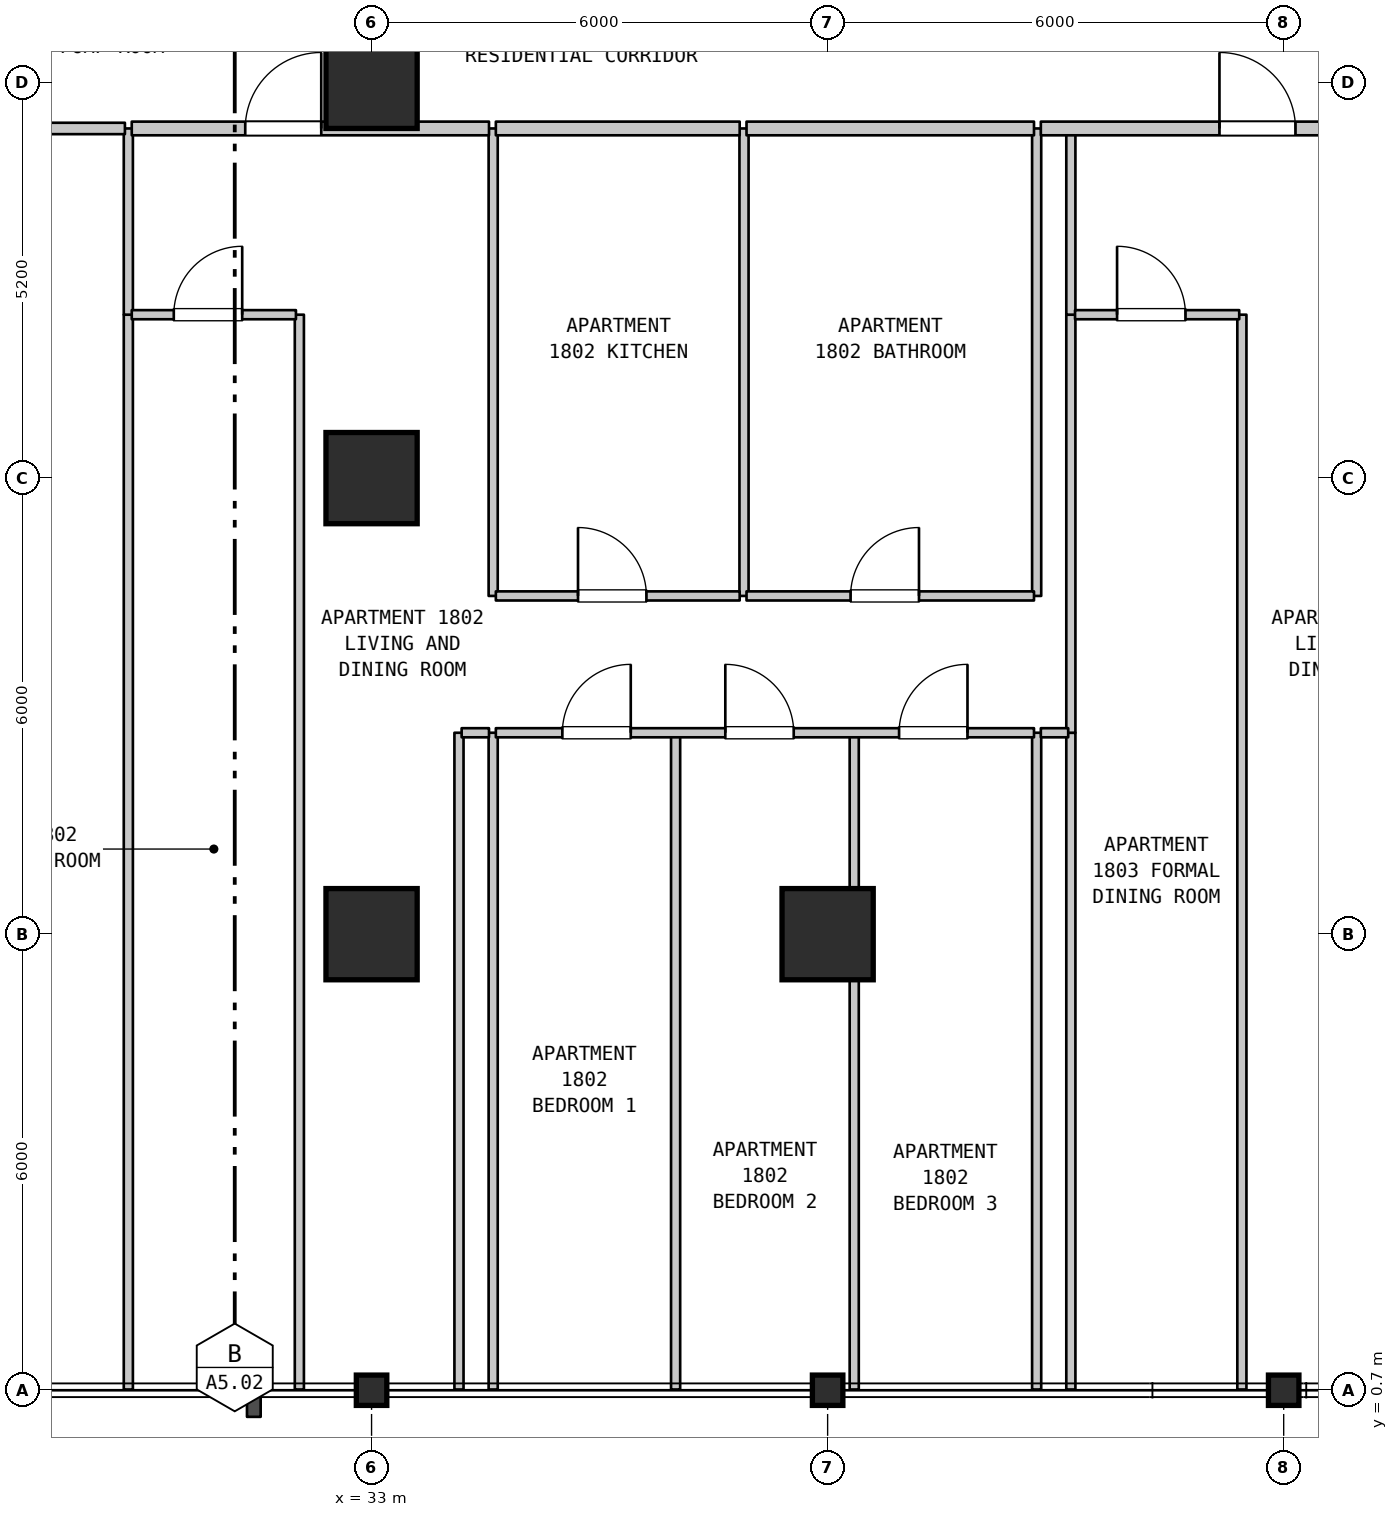
"""IFC4 building model, lengths in metres.
Left out: names, types, materials, properties, quantities, classifications, styles, units other than length and angle.
Written with IfcOpenShell. Run it as: python <this file> out.ifc"""

import sys

from ifc_helpers import new_model, si_unit, direction, frame, frame_2d, origin, origin_2d, place, context, subcontext, project, spatial, rectangle, i_section, extrude, element, fill, save


model = new_model("IFC4")
c1 = context("Model", 3, precision=1e-05, world=origin(), true_north=direction((0.0, 1.0)))
c2 = subcontext(c1, "Body", "Model", "MODEL_VIEW")
j1 = project(units=[si_unit("LENGTHUNIT", "METRE"), si_unit("PLANEANGLEUNIT", "RADIAN")], contexts=[c1])
p1 = place(None, origin())
s1 = spatial("IfcSite", under=j1, at=p1, CompositionType="ELEMENT")
p2 = place(p1, origin())
s2 = spatial("IfcBuilding", under=s1, at=p2, CompositionType="ELEMENT")
p3 = place(p2, frame((0.0, 0.0, 77.5)))
s3 = spatial("IfcBuildingStorey", under=s2, at=p3, CompositionType="ELEMENT", Elevation=77.5)
p4 = place(p3, frame((33.0, 0.7, 0.0), z_axis=(0.0, 0.0, 1.0), x_axis=(1.0, 0.0, 0.0)))
e1 = element("IfcColumn", 1, at=p4, inside=s3, PredefinedType="COLUMN", context=c2, shape_type="SweptSolid", body=[
    extrude(i_section(OverallWidth=0.401, OverallDepth=0.399, WebThickness=0.025, FlangeThickness=0.04, FilletRadius=0.015, at=origin_2d()), origin(), (0.0, 0.0, 1.0), 3.7),
])
for number, where, z_axis, x_axis in (
    (2, (33.0, 6.7, 0.0), (0.0, 0.0, 1.0), (1.0, 0.0, 0.0)),
    (3, (33.0, 12.7, 0.0), (0.0, 0.0, 1.0), (1.0, 0.0, 0.0)),
    (4, (33.0, 17.9, 0.0), (0.0, 0.0, 1.0), (1.0, 0.0, 0.0)),
):
    element("IfcColumn", number, at=place(p3, frame(where, z_axis=z_axis, x_axis=x_axis)), inside=s3, PredefinedType="COLUMN", context=c2, shape_type="SweptSolid", body=[
        extrude(rectangle(XDim=1.2, YDim=1.2, at=origin_2d()), origin(), (0.0, 0.0, 1.0), 3.7),
    ])
p5 = place(p3, frame((39.0, 0.7, 0.0), z_axis=(0.0, 0.0, 1.0), x_axis=(1.0, 0.0, 0.0)))
e5 = element("IfcColumn", 5, at=p5, inside=s3, PredefinedType="COLUMN", context=c2, shape_type="SweptSolid", body=[
    extrude(i_section(OverallWidth=0.401, OverallDepth=0.399, WebThickness=0.025, FlangeThickness=0.04, FilletRadius=0.015, at=origin_2d()), origin(), (0.0, 0.0, 1.0), 3.7),
])
p6 = place(p3, frame((39.0, 6.7, 0.0), z_axis=(0.0, 0.0, 1.0), x_axis=(1.0, 0.0, 0.0)))
e6 = element("IfcColumn", 6, at=p6, inside=s3, PredefinedType="COLUMN", context=c2, shape_type="SweptSolid", body=[
    extrude(rectangle(XDim=1.2, YDim=1.2, at=origin_2d()), origin(), (0.0, 0.0, 1.0), 3.7),
])
p7 = place(p3, frame((45.0, 0.7, 0.0), z_axis=(0.0, 0.0, 1.0), x_axis=(1.0, 0.0, 0.0)))
e7 = element("IfcColumn", 7, at=p7, inside=s3, PredefinedType="COLUMN", context=c2, shape_type="SweptSolid", body=[
    extrude(i_section(OverallWidth=0.401, OverallDepth=0.399, WebThickness=0.025, FlangeThickness=0.04, FilletRadius=0.015, at=origin_2d()), origin(), (0.0, 0.0, 1.0), 3.7),
])
p8 = place(p3, frame((29.8, 0.71, 0.0), z_axis=(0.0, 0.0, 1.0), x_axis=(0.0, 1.0, 0.0)))
e8 = element("IfcWall", 8, at=p8, inside=s3, PredefinedType="PARTITIONING", context=c2, shape_type="SweptSolid", body=[
    extrude(rectangle(XDim=14.14, YDim=0.12, at=frame_2d((7.07, 0.0))), origin(), (0.0, 0.0, 1.0), 3.28),
])
p9 = place(p3, frame((29.8, 14.85, 0.0), z_axis=(0.0, 0.0, 1.0), x_axis=(0.0, 1.0, 0.0)))
e9 = element("IfcWall", 9, at=p9, inside=s3, PredefinedType="PARTITIONING", context=c2, shape_type="SweptSolid", body=[
    extrude(rectangle(XDim=2.45, YDim=0.12, at=frame_2d((1.225, 0.0))), origin(), (0.0, 0.0, 1.0), 3.28),
])
p10 = place(p3, frame((32.05, 0.71, 0.0), z_axis=(0.0, 0.0, 1.0), x_axis=(0.0, 1.0, 0.0)))
e10 = element("IfcWall", 10, at=p10, inside=s3, PredefinedType="PARTITIONING", context=c2, shape_type="SweptSolid", body=[
    extrude(rectangle(XDim=14.14, YDim=0.12, at=frame_2d((7.07, 0.0))), origin(), (0.0, 0.0, 1.0), 3.28),
])
for number, where, z_axis, x_axis in (
    (11, (34.15, 0.71, 0.0), (0.0, 0.0, 1.0), (0.0, 1.0, 0.0)),
    (12, (34.6, 0.71, 0.0), (0.0, 0.0, 1.0), (0.0, 1.0, 0.0)),
):
    element("IfcWall", number, at=place(p3, frame(where, z_axis=z_axis, x_axis=x_axis)), inside=s3, PredefinedType="PARTITIONING", context=c2, shape_type="SweptSolid", body=[
        extrude(rectangle(XDim=8.64, YDim=0.12, at=frame_2d((4.32, 0.0))), origin(), (0.0, 0.0, 1.0), 3.28),
    ])
p11 = place(p3, frame((34.6, 11.15, 0.0), z_axis=(0.0, 0.0, 1.0), x_axis=(0.0, 1.0, 0.0)))
e13 = element("IfcWall", 13, at=p11, inside=s3, PredefinedType="PARTITIONING", context=c2, shape_type="SweptSolid", body=[
    extrude(rectangle(XDim=6.15, YDim=0.12, at=frame_2d((3.075, 0.0))), origin(), (0.0, 0.0, 1.0), 3.28),
])
p12 = place(p3, frame((37.0, 0.71, 0.0), z_axis=(0.0, 0.0, 1.0), x_axis=(0.0, 1.0, 0.0)))
e14 = element("IfcWall", 14, at=p12, inside=s3, PredefinedType="PARTITIONING", context=c2, shape_type="SweptSolid", body=[
    extrude(rectangle(XDim=8.64, YDim=0.12, at=frame_2d((4.32, 0.0))), origin(), (0.0, 0.0, 1.0), 3.28),
])
p13 = place(p3, frame((37.9, 11.15, 0.0), z_axis=(0.0, 0.0, 1.0), x_axis=(0.0, 1.0, 0.0)))
e15 = element("IfcWall", 15, at=p13, inside=s3, PredefinedType="PARTITIONING", context=c2, shape_type="SweptSolid", body=[
    extrude(rectangle(XDim=6.15, YDim=0.12, at=frame_2d((3.075, 0.0))), origin(), (0.0, 0.0, 1.0), 3.28),
])
for number, where, z_axis, x_axis in (
    (16, (39.35, 0.71, 0.0), (0.0, 0.0, 1.0), (0.0, 1.0, 0.0)),
    (17, (41.75, 0.71, 0.0), (0.0, 0.0, 1.0), (0.0, 1.0, 0.0)),
):
    element("IfcWall", number, at=place(p3, frame(where, z_axis=z_axis, x_axis=x_axis)), inside=s3, PredefinedType="PARTITIONING", context=c2, shape_type="SweptSolid", body=[
        extrude(rectangle(XDim=8.64, YDim=0.12, at=frame_2d((4.32, 0.0))), origin(), (0.0, 0.0, 1.0), 3.28),
    ])
p14 = place(p3, frame((41.75, 11.15, 0.0), z_axis=(0.0, 0.0, 1.0), x_axis=(0.0, 1.0, 0.0)))
e18 = element("IfcWall", 18, at=p14, inside=s3, PredefinedType="PARTITIONING", context=c2, shape_type="SweptSolid", body=[
    extrude(rectangle(XDim=6.15, YDim=0.12, at=frame_2d((3.075, 0.0))), origin(), (0.0, 0.0, 1.0), 3.28),
])
p15 = place(p3, frame((42.2, 0.71, 0.0), z_axis=(0.0, 0.0, 1.0), x_axis=(0.0, 1.0, 0.0)))
e19 = element("IfcWall", 19, at=p15, inside=s3, PredefinedType="PARTITIONING", context=c2, shape_type="SweptSolid", body=[
    extrude(rectangle(XDim=8.64, YDim=0.12, at=frame_2d((4.32, 0.0))), origin(), (0.0, 0.0, 1.0), 3.28),
])
p16 = place(p3, frame((42.2, 9.35, 0.0), z_axis=(0.0, 0.0, 1.0), x_axis=(0.0, 1.0, 0.0)))
e20 = element("IfcWall", 20, at=p16, inside=s3, PredefinedType="PARTITIONING", context=c2, shape_type="SweptSolid", body=[
    extrude(rectangle(XDim=5.5, YDim=0.12, at=frame_2d((2.75, 0.0))), origin(), (0.0, 0.0, 1.0), 3.28),
])
p17 = place(p3, frame((42.2, 14.85, 0.0), z_axis=(0.0, 0.0, 1.0), x_axis=(0.0, 1.0, 0.0)))
e21 = element("IfcWall", 21, at=p17, inside=s3, PredefinedType="PARTITIONING", context=c2, shape_type="SweptSolid", body=[
    extrude(rectangle(XDim=2.45, YDim=0.12, at=frame_2d((1.225, 0.0))), origin(), (0.0, 0.0, 1.0), 3.28),
])
p18 = place(p3, frame((44.45, 0.71, 0.0), z_axis=(0.0, 0.0, 1.0), x_axis=(0.0, 1.0, 0.0)))
e22 = element("IfcWall", 22, at=p18, inside=s3, PredefinedType="PARTITIONING", context=c2, shape_type="SweptSolid", body=[
    extrude(rectangle(XDim=14.14, YDim=0.12, at=frame_2d((7.07, 0.0))), origin(), (0.0, 0.0, 1.0), 3.28),
])
p19 = place(p3, frame((34.185, 9.35, 0.0), z_axis=(0.0, 0.0, 1.0), x_axis=(1.0, 0.0, 0.0)))
e23 = element("IfcWall", 23, at=p19, inside=s3, PredefinedType="PARTITIONING", context=c2, shape_type="SweptSolid", body=[
    extrude(rectangle(XDim=0.36, YDim=0.12, at=frame_2d((0.18, 0.0))), origin(), (0.0, 0.0, 1.0), 3.28),
])
p20 = place(p3, frame((34.635, 9.35, 0.0), z_axis=(0.0, 0.0, 1.0), x_axis=(1.0, 0.0, 0.0)))
e24 = element("IfcWall", 24, at=p20, inside=s3, PredefinedType="PARTITIONING", context=c2, shape_type="SweptSolid", body=[
    extrude(rectangle(XDim=7.08, YDim=0.12, at=frame_2d((3.54, 0.0))), origin(), (0.0, 0.0, 1.0), 3.28),
])
p21 = place(p20, frame((0.875, 0.0, 0.0)))
e25 = element("IfcOpeningElement", 25, at=p21, cuts=e24, PredefinedType="OPENING", context=c2, shape_type="SweptSolid", body=[
    extrude(rectangle(XDim=0.9, YDim=2.15, at=frame_2d((0.45, 1.075))), frame((0.0, 0.07, 0.0), z_axis=(0.0, -1.0, 0.0), x_axis=(1.0, 0.0, 0.0)), (0.0, 0.0, 1.0), 0.14),
])
p22 = place(p20, frame((3.019, 0.0, 0.0)))
e26 = element("IfcOpeningElement", 26, at=p22, cuts=e24, PredefinedType="OPENING", context=c2, shape_type="SweptSolid", body=[
    extrude(rectangle(XDim=0.9, YDim=2.15, at=frame_2d((0.45, 1.075))), frame((0.0, 0.07, 0.0), z_axis=(0.0, -1.0, 0.0), x_axis=(1.0, 0.0, 0.0)), (0.0, 0.0, 1.0), 0.14),
])
p23 = place(p20, frame((5.305, 0.0, 0.0)))
e27 = element("IfcOpeningElement", 27, at=p23, cuts=e24, PredefinedType="OPENING", context=c2, shape_type="SweptSolid", body=[
    extrude(rectangle(XDim=0.9, YDim=2.15, at=frame_2d((0.45, 1.075))), frame((0.0, 0.07, 0.0), z_axis=(0.0, -1.0, 0.0), x_axis=(1.0, 0.0, 0.0)), (0.0, 0.0, 1.0), 0.14),
])
p24 = place(p3, frame((41.805, 9.35, 0.0), z_axis=(0.0, 0.0, 1.0), x_axis=(1.0, 0.0, 0.0)))
e28 = element("IfcWall", 28, at=p24, inside=s3, PredefinedType="PARTITIONING", context=c2, shape_type="SweptSolid", body=[
    extrude(rectangle(XDim=0.36, YDim=0.12, at=frame_2d((0.18, 0.0))), origin(), (0.0, 0.0, 1.0), 3.28),
])
p25 = place(p3, frame((34.635, 11.15, 0.0), z_axis=(0.0, 0.0, 1.0), x_axis=(1.0, 0.0, 0.0)))
e29 = element("IfcWall", 29, at=p25, inside=s3, PredefinedType="PARTITIONING", context=c2, shape_type="SweptSolid", body=[
    extrude(rectangle(XDim=3.208, YDim=0.12, at=frame_2d((1.604, 0.0))), origin(), (0.0, 0.0, 1.0), 3.28),
])
p26 = place(p25, frame((1.081, 0.0, 0.0)))
e30 = element("IfcOpeningElement", 30, at=p26, cuts=e29, PredefinedType="OPENING", context=c2, shape_type="SweptSolid", body=[
    extrude(rectangle(XDim=0.9, YDim=2.15, at=frame_2d((0.45, 1.075))), frame((0.0, 0.07, 0.0), z_axis=(0.0, -1.0, 0.0), x_axis=(1.0, 0.0, 0.0)), (0.0, 0.0, 1.0), 0.14),
])
p27 = place(p3, frame((37.933, 11.15, 0.0), z_axis=(0.0, 0.0, 1.0), x_axis=(1.0, 0.0, 0.0)))
e31 = element("IfcWall", 31, at=p27, inside=s3, PredefinedType="PARTITIONING", context=c2, shape_type="SweptSolid", body=[
    extrude(rectangle(XDim=3.782, YDim=0.12, at=frame_2d((1.891, 0.0))), origin(), (0.0, 0.0, 1.0), 3.28),
])
p28 = place(p27, frame((1.369, 0.0, 0.0)))
e32 = element("IfcOpeningElement", 32, at=p28, cuts=e31, PredefinedType="OPENING", context=c2, shape_type="SweptSolid", body=[
    extrude(rectangle(XDim=0.9, YDim=2.1, at=frame_2d((0.45, 1.05))), frame((0.0, 0.07, 0.0), z_axis=(0.0, -1.0, 0.0), x_axis=(1.0, 0.0, 0.0)), (0.0, 0.0, 1.0), 0.14),
])
p29 = place(p3, frame((29.845, 14.85, 0.0), z_axis=(0.0, 0.0, 1.0), x_axis=(1.0, 0.0, 0.0)))
e33 = element("IfcWall", 33, at=p29, inside=s3, PredefinedType="PARTITIONING", context=c2, shape_type="SweptSolid", body=[
    extrude(rectangle(XDim=2.16, YDim=0.12, at=frame_2d((1.08, 0.0))), origin(), (0.0, 0.0, 1.0), 3.28),
])
p30 = place(p29, frame((0.553, 0.0, 0.0)))
e34 = element("IfcOpeningElement", 34, at=p30, cuts=e33, PredefinedType="OPENING", context=c2, shape_type="SweptSolid", body=[
    extrude(rectangle(XDim=0.9, YDim=2.15, at=frame_2d((0.45, 1.075))), frame((0.0, 0.07, 0.0), z_axis=(0.0, -1.0, 0.0), x_axis=(1.0, 0.0, 0.0)), (0.0, 0.0, 1.0), 0.14),
])
p31 = place(p3, frame((42.255, 14.85, 0.0), z_axis=(0.0, 0.0, 1.0), x_axis=(1.0, 0.0, 0.0)))
e35 = element("IfcWall", 35, at=p31, inside=s3, PredefinedType="PARTITIONING", context=c2, shape_type="SweptSolid", body=[
    extrude(rectangle(XDim=2.16, YDim=0.12, at=frame_2d((1.08, 0.0))), origin(), (0.0, 0.0, 1.0), 3.28),
])
p32 = place(p31, frame((0.553, 0.0, 0.0)))
e36 = element("IfcOpeningElement", 36, at=p32, cuts=e35, PredefinedType="OPENING", context=c2, shape_type="SweptSolid", body=[
    extrude(rectangle(XDim=0.9, YDim=2.15, at=frame_2d((0.45, 1.075))), frame((0.0, 0.07, 0.0), z_axis=(0.0, -1.0, 0.0), x_axis=(1.0, 0.0, 0.0)), (0.0, 0.0, 1.0), 0.14),
])
p33 = place(p3, frame((25.545, 17.3, 0.0), z_axis=(0.0, 0.0, 1.0), x_axis=(1.0, 0.0, 0.0)))
e37 = element("IfcWall", 37, at=p33, inside=s3, PredefinedType="STANDARD", context=c2, shape_type="SweptSolid", body=[
    extrude(rectangle(XDim=4.21, YDim=0.15, at=frame_2d((2.105, 0.0))), origin(), (0.0, 0.0, 1.0), 3.28),
])
p34 = place(p33, frame((1.605, 0.0, 0.0)))
e38 = element("IfcOpeningElement", 38, at=p34, cuts=e37, PredefinedType="OPENING", context=c2, shape_type="SweptSolid", body=[
    extrude(rectangle(XDim=1.0, YDim=2.15, at=frame_2d((0.5, 1.075))), frame((0.0, 0.085, 0.0), z_axis=(0.0, -1.0, 0.0), x_axis=(1.0, 0.0, 0.0)), (0.0, 0.0, 1.0), 0.17),
])
p35 = place(p3, frame((29.845, 17.3, 0.0), z_axis=(0.0, 0.0, 1.0), x_axis=(1.0, 0.0, 0.0)))
e39 = element("IfcWall", 39, at=p35, inside=s3, PredefinedType="STANDARD", context=c2, shape_type="SweptSolid", body=[
    extrude(rectangle(XDim=4.7, YDim=0.18, at=frame_2d((2.35, 0.0))), origin(), (0.0, 0.0, 1.0), 3.28),
])
p36 = place(p35, frame((1.493, 0.0, 0.0)))
e40 = element("IfcOpeningElement", 40, at=p36, cuts=e39, PredefinedType="OPENING", context=c2, shape_type="SweptSolid", body=[
    extrude(rectangle(XDim=1.0, YDim=2.15, at=frame_2d((0.5, 1.075))), frame((0.0, 0.1, 0.0), z_axis=(0.0, -1.0, 0.0), x_axis=(1.0, 0.0, 0.0)), (0.0, 0.0, 1.0), 0.2),
])
p37 = place(p3, frame((34.635, 17.3, 0.0), z_axis=(0.0, 0.0, 1.0), x_axis=(1.0, 0.0, 0.0)))
e41 = element("IfcWall", 41, at=p37, inside=s3, PredefinedType="STANDARD", context=c2, shape_type="SweptSolid", body=[
    extrude(rectangle(XDim=3.208, YDim=0.18, at=frame_2d((1.604, 0.0))), origin(), (0.0, 0.0, 1.0), 3.28),
])
p38 = place(p3, frame((37.933, 17.3, 0.0), z_axis=(0.0, 0.0, 1.0), x_axis=(1.0, 0.0, 0.0)))
e42 = element("IfcWall", 42, at=p38, inside=s3, PredefinedType="STANDARD", context=c2, shape_type="SweptSolid", body=[
    extrude(rectangle(XDim=3.782, YDim=0.18, at=frame_2d((1.891, 0.0))), origin(), (0.0, 0.0, 1.0), 3.28),
])
p39 = place(p3, frame((41.805, 17.3, 0.0), z_axis=(0.0, 0.0, 1.0), x_axis=(1.0, 0.0, 0.0)))
e43 = element("IfcWall", 43, at=p39, inside=s3, PredefinedType="STANDARD", context=c2, shape_type="SweptSolid", body=[
    extrude(rectangle(XDim=5.3, YDim=0.18, at=frame_2d((2.65, 0.0))), origin(), (0.0, 0.0, 1.0), 3.28),
])
p40 = place(p39, frame((2.35, 0.0, 0.0)))
e44 = element("IfcOpeningElement", 44, at=p40, cuts=e43, PredefinedType="OPENING", context=c2, shape_type="SweptSolid", body=[
    extrude(rectangle(XDim=1.0, YDim=2.15, at=frame_2d((0.5, 1.075))), frame((0.0, 0.1, 0.0), z_axis=(0.0, -1.0, 0.0), x_axis=(1.0, 0.0, 0.0)), (0.0, 0.0, 1.0), 0.2),
])
p41 = place(p21, origin())
e45 = element("IfcDoor", 45, at=p41, inside=s3, OperationType="SINGLE_SWING_RIGHT", PredefinedType="DOOR", context=c2, shape_type="SweptSolid", body=[
    extrude(rectangle(XDim=0.9, YDim=2.15, at=frame_2d((0.45, 1.075))), frame((0.0, 0.025, 0.0), z_axis=(0.0, -1.0, 0.0), x_axis=(1.0, 0.0, 0.0)), (0.0, 0.0, 1.0), 0.05),
])
fill(e25, e45)
p42 = place(p22, origin())
e46 = element("IfcDoor", 46, at=p42, inside=s3, OperationType="SINGLE_SWING_LEFT", PredefinedType="DOOR", context=c2, shape_type="SweptSolid", body=[
    extrude(rectangle(XDim=0.9, YDim=2.15, at=frame_2d((0.45, 1.075))), frame((0.0, 0.025, 0.0), z_axis=(0.0, -1.0, 0.0), x_axis=(1.0, 0.0, 0.0)), (0.0, 0.0, 1.0), 0.05),
])
fill(e26, e46)
p43 = place(p23, origin())
e47 = element("IfcDoor", 47, at=p43, inside=s3, OperationType="SINGLE_SWING_RIGHT", PredefinedType="DOOR", context=c2, shape_type="SweptSolid", body=[
    extrude(rectangle(XDim=0.9, YDim=2.15, at=frame_2d((0.45, 1.075))), frame((0.0, 0.025, 0.0), z_axis=(0.0, -1.0, 0.0), x_axis=(1.0, 0.0, 0.0)), (0.0, 0.0, 1.0), 0.05),
])
fill(e27, e47)
p44 = place(p26, origin())
e48 = element("IfcDoor", 48, at=p44, inside=s3, OperationType="SINGLE_SWING_LEFT", PredefinedType="DOOR", context=c2, shape_type="SweptSolid", body=[
    extrude(rectangle(XDim=0.9, YDim=2.15, at=frame_2d((0.45, 1.075))), frame((0.0, 0.025, 0.0), z_axis=(0.0, -1.0, 0.0), x_axis=(1.0, 0.0, 0.0)), (0.0, 0.0, 1.0), 0.05),
])
fill(e30, e48)
p45 = place(p28, origin())
e49 = element("IfcDoor", 49, at=p45, inside=s3, OperationType="SINGLE_SWING_RIGHT", PredefinedType="DOOR", context=c2, shape_type="SweptSolid", body=[
    extrude(rectangle(XDim=0.9, YDim=2.1, at=frame_2d((0.45, 1.05))), frame((0.0, 0.025, 0.0), z_axis=(0.0, -1.0, 0.0), x_axis=(1.0, 0.0, 0.0)), (0.0, 0.0, 1.0), 0.05),
])
fill(e32, e49)
p46 = place(p30, origin())
e50 = element("IfcDoor", 50, at=p46, inside=s3, OperationType="SINGLE_SWING_RIGHT", PredefinedType="DOOR", context=c2, shape_type="SweptSolid", body=[
    extrude(rectangle(XDim=0.9, YDim=2.15, at=frame_2d((0.45, 1.075))), frame((0.0, 0.025, 0.0), z_axis=(0.0, -1.0, 0.0), x_axis=(1.0, 0.0, 0.0)), (0.0, 0.0, 1.0), 0.05),
])
fill(e34, e50)
p47 = place(p32, origin())
e51 = element("IfcDoor", 51, at=p47, inside=s3, OperationType="SINGLE_SWING_LEFT", PredefinedType="DOOR", context=c2, shape_type="SweptSolid", body=[
    extrude(rectangle(XDim=0.9, YDim=2.15, at=frame_2d((0.45, 1.075))), frame((0.0, 0.025, 0.0), z_axis=(0.0, -1.0, 0.0), x_axis=(1.0, 0.0, 0.0)), (0.0, 0.0, 1.0), 0.05),
])
fill(e36, e51)
p48 = place(p36, origin())
e52 = element("IfcDoor", 52, at=p48, inside=s3, OperationType="SINGLE_SWING_RIGHT", PredefinedType="DOOR", context=c2, shape_type="SweptSolid", body=[
    extrude(rectangle(XDim=1.0, YDim=2.15, at=frame_2d((0.5, 1.075))), frame((0.0, 0.025, 0.0), z_axis=(0.0, -1.0, 0.0), x_axis=(1.0, 0.0, 0.0)), (0.0, 0.0, 1.0), 0.05),
])
fill(e40, e52)
p49 = place(p40, origin())
e53 = element("IfcDoor", 53, at=p49, inside=s3, OperationType="SINGLE_SWING_LEFT", PredefinedType="DOOR", context=c2, shape_type="SweptSolid", body=[
    extrude(rectangle(XDim=1.0, YDim=2.15, at=frame_2d((0.5, 1.075))), frame((0.0, 0.025, 0.0), z_axis=(0.0, -1.0, 0.0), x_axis=(1.0, 0.0, 0.0)), (0.0, 0.0, 1.0), 0.05),
])
fill(e44, e53)
save(model, sys.argv[1])
